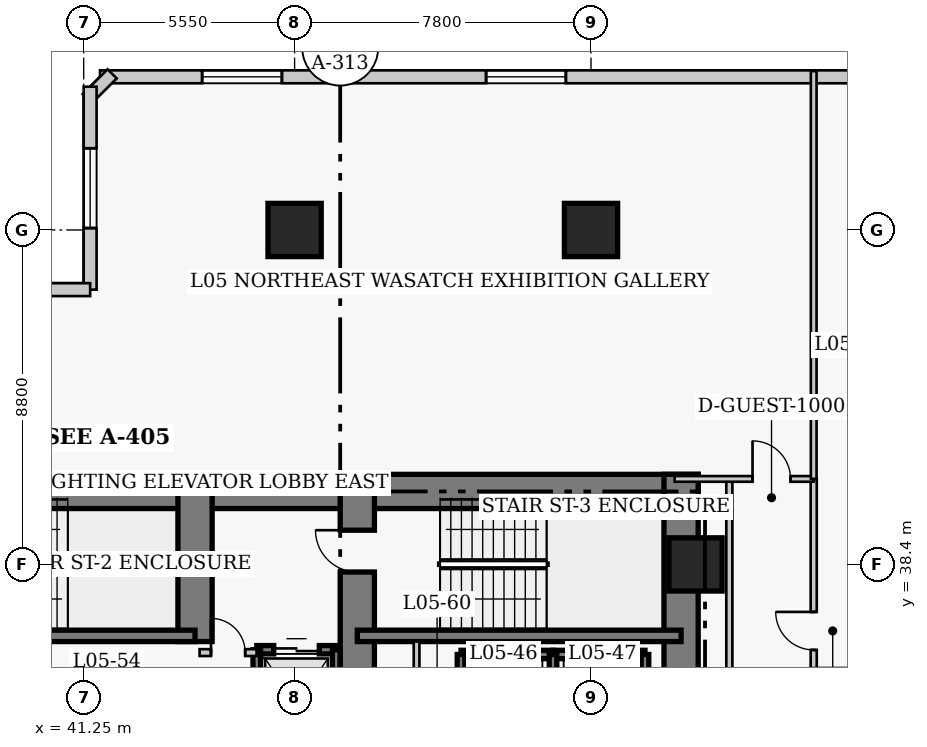
"""IFC4 building model, lengths in metres.
Left out: names, types, materials, properties, quantities, classifications, styles, units other than length and angle.
Written with IfcOpenShell. Run it as: python <this file> out.ifc"""

import sys

from ifc_helpers import new_model, si_unit, direction, frame, frame_2d, origin, origin_2d, place, context, subcontext, project, spatial, rectangle, extrude, element, fill, save


model = new_model("IFC4")
c1 = context("Model", 3, precision=1e-05, world=origin(), true_north=direction((0.0, 1.0)))
c2 = subcontext(c1, "Body", "Model", "MODEL_VIEW")
j1 = project(units=[si_unit("LENGTHUNIT", "METRE"), si_unit("PLANEANGLEUNIT", "RADIAN")], contexts=[c1])
p1 = place(None, origin())
s1 = spatial("IfcSite", under=j1, at=p1, CompositionType="ELEMENT")
p2 = place(p1, origin())
s2 = spatial("IfcBuilding", under=s1, at=p2, CompositionType="ELEMENT")
p3 = place(p2, frame((0.0, 0.0, 26.0)))
s3 = spatial("IfcBuildingStorey", under=s2, at=p3, CompositionType="ELEMENT", Elevation=26.0)
p4 = place(p3, frame((35.85, 40.32, 0.0), z_axis=(0.0, 0.0, 1.0), x_axis=(1.0, 0.0, 0.0)))
e1 = element("IfcWall", 1, at=p4, inside=s3, PredefinedType="SHEAR", context=c2, shape_type="SweptSolid", body=[
    extrude(rectangle(XDim=12.6, YDim=0.9, at=frame_2d((6.3, 0.0))), origin(), (0.0, 0.0, 1.0), 3.8),
])
p5 = place(p3, frame((48.45, 40.32, 0.0), z_axis=(0.0, 0.0, 1.0), x_axis=(1.0, 0.0, 0.0)))
e2 = element("IfcWall", 2, at=p5, inside=s3, PredefinedType="SHEAR", context=c2, shape_type="SweptSolid", body=[
    extrude(rectangle(XDim=8.97, YDim=0.9, at=frame_2d((4.485, 0.0))), origin(), (0.0, 0.0, 1.0), 3.8),
])
p6 = place(p3, frame((56.97, 27.05, 0.0), z_axis=(0.0, 0.0, 1.0), x_axis=(0.0, 1.0, 0.0)))
e3 = element("IfcWall", 3, at=p6, inside=s3, PredefinedType="SHEAR", context=c2, shape_type="SweptSolid", body=[
    extrude(rectangle(XDim=13.72, YDim=0.9, at=frame_2d((6.86, 0.0))), origin(), (0.0, 0.0, 1.0), 3.8),
])
p7 = place(p3, frame((44.18, 36.37, 0.0), z_axis=(0.0, 0.0, 1.0), x_axis=(0.0, 1.0, 0.0)))
e4 = element("IfcWall", 4, at=p7, inside=s3, PredefinedType="SHEAR", context=c2, shape_type="SweptSolid", body=[
    extrude(rectangle(XDim=3.95, YDim=0.9, at=frame_2d((1.975, 0.0))), origin(), (0.0, 0.0, 1.0), 3.8),
])
p8 = place(p3, frame((48.45, 32.3, 0.0), z_axis=(0.0, 0.0, 1.0), x_axis=(0.0, 1.0, 0.0)))
e5 = element("IfcWall", 5, at=p8, inside=s3, PredefinedType="SHEAR", context=c2, shape_type="SweptSolid", body=[
    extrude(rectangle(XDim=8.02, YDim=0.9, at=frame_2d((4.01, 0.0))), origin(), (0.0, 0.0, 1.0), 3.8),
])
p9 = place(p8, frame((5.9, 0.0, 0.0)))
e6 = element("IfcOpeningElement", 6, at=p9, cuts=e5, PredefinedType="OPENING", context=c2, shape_type="SweptSolid", body=[
    extrude(rectangle(XDim=1.1, YDim=2.15, at=frame_2d((0.55, 1.075))), frame((0.0, 0.46, 0.0), z_axis=(0.0, -1.0, 0.0), x_axis=(1.0, 0.0, 0.0)), (0.0, 0.0, 1.0), 0.92),
])
p10 = place(p3, frame((35.85, 36.52, 0.0), z_axis=(0.0, 0.0, 1.0), x_axis=(1.0, 0.0, 0.0)))
e7 = element("IfcWall", 7, at=p10, inside=s3, PredefinedType="SHEAR", context=c2, shape_type="SweptSolid", body=[
    extrude(rectangle(XDim=8.33, YDim=0.3, at=frame_2d((4.165, 0.0))), origin(), (0.0, 0.0, 1.0), 3.8),
])
p11 = place(p3, frame((48.45, 36.52, 0.0), z_axis=(0.0, 0.0, 1.0), x_axis=(1.0, 0.0, 0.0)))
e8 = element("IfcWall", 8, at=p11, inside=s3, PredefinedType="SHEAR", context=c2, shape_type="SweptSolid", body=[
    extrude(rectangle(XDim=8.52, YDim=0.3, at=frame_2d((4.26, 0.0))), origin(), (0.0, 0.0, 1.0), 3.8),
])
for number, where, z_axis, x_axis in (
    (9, (46.8, 47.2, 0.0), (0.0, 0.0, 1.0), (1.0, 0.0, 0.0)),
    (10, (54.6, 47.2, 0.0), (0.0, 0.0, 1.0), (1.0, 0.0, 0.0)),
    (11, (57.35, 38.4, 0.0), (0.0, 0.0, 1.0), (1.0, 0.0, 0.0)),
):
    element("IfcColumn", number, at=place(p3, frame(where, z_axis=z_axis, x_axis=x_axis)), inside=s3, PredefinedType="COLUMN", context=c2, shape_type="SweptSolid", body=[
        extrude(rectangle(XDim=1.4, YDim=1.4, at=origin_2d()), origin(), (0.0, 0.0, 1.0), 3.8),
    ])
p12 = place(p3, frame((71.57, 51.23, 0.0), z_axis=(0.0, 0.0, 1.0), x_axis=(-1.0, 0.0, 0.0)))
e12 = element("IfcWall", 12, at=p12, inside=s3, PredefinedType="SOLIDWALL", context=c2, shape_type="SweptSolid", body=[
    extrude(rectangle(XDim=29.89, YDim=0.34, at=frame_2d((14.945, 0.0))), origin(), (0.0, 0.0, 1.0), 3.54),
])
p13 = place(p12, frame((2.686, 0.0, 0.85)))
e13 = element("IfcOpeningElement", 13, at=p13, cuts=e12, PredefinedType="OPENING", context=c2, shape_type="SweptSolid", body=[
    extrude(rectangle(XDim=2.1, YDim=1.85, at=frame_2d((1.05, 0.925))), frame((0.0, 0.18, 0.0), z_axis=(0.0, -1.0, 0.0), x_axis=(1.0, 0.0, 0.0)), (0.0, 0.0, 1.0), 0.36),
])
p14 = place(p12, frame((17.631, 0.0, 0.85)))
e14 = element("IfcOpeningElement", 14, at=p14, cuts=e12, PredefinedType="OPENING", context=c2, shape_type="SweptSolid", body=[
    extrude(rectangle(XDim=2.1, YDim=1.85, at=frame_2d((1.05, 0.925))), frame((0.0, 0.18, 0.0), z_axis=(0.0, -1.0, 0.0), x_axis=(1.0, 0.0, 0.0)), (0.0, 0.0, 1.0), 0.36),
])
p15 = place(p12, frame((25.104, 0.0, 0.85)))
e15 = element("IfcOpeningElement", 15, at=p15, cuts=e12, PredefinedType="OPENING", context=c2, shape_type="SweptSolid", body=[
    extrude(rectangle(XDim=2.1, YDim=1.85, at=frame_2d((1.05, 0.925))), frame((0.0, 0.18, 0.0), z_axis=(0.0, -1.0, 0.0), x_axis=(1.0, 0.0, 0.0)), (0.0, 0.0, 1.0), 0.36),
])
p16 = place(p3, frame((41.999, 51.308, 0.0), z_axis=(0.0, 0.0, 1.0), x_axis=(-0.707238225886, -0.706975312048, 0.0)))
e16 = element("IfcWall", 16, at=p16, inside=s3, PredefinedType="SOLIDWALL", context=c2, shape_type="SweptSolid", body=[
    extrude(rectangle(XDim=0.929, YDim=0.34, at=frame_2d((0.464, 0.0))), origin(), (0.0, 0.0, 1.0), 3.54),
])
p17 = place(p3, frame((41.42, 50.97, 0.0), z_axis=(0.0, 0.0, 1.0), x_axis=(0.0, -1.0, 0.0)))
e17 = element("IfcWall", 17, at=p17, inside=s3, PredefinedType="SOLIDWALL", context=c2, shape_type="SweptSolid", body=[
    extrude(rectangle(XDim=5.34, YDim=0.34, at=frame_2d((2.67, 0.0))), origin(), (0.0, 0.0, 1.0), 3.54),
])
p18 = place(p17, frame((1.62, 0.0, 0.85)))
e18 = element("IfcOpeningElement", 18, at=p18, cuts=e17, PredefinedType="OPENING", context=c2, shape_type="SweptSolid", body=[
    extrude(rectangle(XDim=2.1, YDim=1.85, at=frame_2d((1.05, 0.925))), frame((0.0, 0.18, 0.0), z_axis=(0.0, -1.0, 0.0), x_axis=(1.0, 0.0, 0.0)), (0.0, 0.0, 1.0), 0.36),
])
p19 = place(p3, frame((41.42, 45.63, 0.0), z_axis=(0.0, 0.0, 1.0), x_axis=(-1.0, 0.0, 0.0)))
e19 = element("IfcWall", 19, at=p19, inside=s3, PredefinedType="SOLIDWALL", context=c2, shape_type="SweptSolid", body=[
    extrude(rectangle(XDim=4.84, YDim=0.34, at=frame_2d((2.42, 0.0))), origin(), (0.0, 0.0, 1.0), 3.54),
])
p20 = place(p19, frame((1.37, 0.0, 0.85)))
e20 = element("IfcOpeningElement", 20, at=p20, cuts=e19, PredefinedType="OPENING", context=c2, shape_type="SweptSolid", body=[
    extrude(rectangle(XDim=2.1, YDim=1.85, at=frame_2d((1.05, 0.925))), frame((0.0, 0.18, 0.0), z_axis=(0.0, -1.0, 0.0), x_axis=(1.0, 0.0, 0.0)), (0.0, 0.0, 1.0), 0.36),
])
p21 = place(p3, frame((51.18, 36.03, 0.0), z_axis=(0.0, 0.0, 1.0), x_axis=(1.0, 0.0, 0.0)))
e21 = element("IfcWall", 21, at=p21, inside=s3, PredefinedType="SHEAR", context=c2, shape_type="SweptSolid", body=[
    extrude(rectangle(XDim=2.42, YDim=0.22, at=frame_2d((1.21, 0.0))), origin(), (0.0, 0.0, 1.0), 3.8),
])
p22 = place(p3, frame((51.18, 33.17, 0.0), z_axis=(0.0, 0.0, 1.0), x_axis=(0.0, 1.0, 0.0)))
e22 = element("IfcWall", 22, at=p22, inside=s3, PredefinedType="SHEAR", context=c2, shape_type="SweptSolid", body=[
    extrude(rectangle(XDim=2.86, YDim=0.2, at=frame_2d((1.43, 0.0))), origin(), (0.0, 0.0, 1.0), 3.8),
])
p23 = place(p3, frame((53.6, 36.03, 0.0), z_axis=(0.0, 0.0, 1.0), x_axis=(1.0, 0.0, 0.0)))
e23 = element("IfcWall", 23, at=p23, inside=s3, PredefinedType="SHEAR", context=c2, shape_type="SweptSolid", body=[
    extrude(rectangle(XDim=2.42, YDim=0.22, at=frame_2d((1.21, 0.0))), origin(), (0.0, 0.0, 1.0), 3.8),
])
for number, where, z_axis, x_axis in (
    (24, (53.6, 33.17, 0.0), (0.0, 0.0, 1.0), (0.0, 1.0, 0.0)),
    (25, (56.02, 33.17, 0.0), (0.0, 0.0, 1.0), (0.0, 1.0, 0.0)),
):
    element("IfcWall", number, at=place(p3, frame(where, z_axis=z_axis, x_axis=x_axis)), inside=s3, PredefinedType="SHEAR", context=c2, shape_type="SweptSolid", body=[
        extrude(rectangle(XDim=2.86, YDim=0.2, at=frame_2d((1.43, 0.0))), origin(), (0.0, 0.0, 1.0), 3.8),
    ])
p24 = place(p3, frame((45.805, 36.155, 0.0), z_axis=(0.0, 0.0, 1.0), x_axis=(1.0, 0.0, 0.0)))
e26 = element("IfcWall", 26, at=p24, inside=s3, PredefinedType="SHEAR", context=c2, shape_type="SweptSolid", body=[
    extrude(rectangle(XDim=2.09, YDim=0.22, at=frame_2d((1.045, 0.0))), origin(), (0.0, 0.0, 1.0), 3.8),
])
p25 = place(p24, frame((0.445, 0.0, 0.0)))
e27 = element("IfcOpeningElement", 27, at=p25, cuts=e26, PredefinedType="OPENING", context=c2, shape_type="SweptSolid", body=[
    extrude(rectangle(XDim=1.2, YDim=2.15, at=frame_2d((0.6, 1.075))), frame((0.0, 0.12, 0.0), z_axis=(0.0, -1.0, 0.0), x_axis=(1.0, 0.0, 0.0)), (0.0, 0.0, 1.0), 0.24),
])
p26 = place(p3, frame((45.805, 32.65, 0.0), z_axis=(0.0, 0.0, 1.0), x_axis=(0.0, 1.0, 0.0)))
e28 = element("IfcWall", 28, at=p26, inside=s3, PredefinedType="SHEAR", context=c2, shape_type="SweptSolid", body=[
    extrude(rectangle(XDim=3.505, YDim=0.2, at=frame_2d((1.752, 0.0))), origin(), (0.0, 0.0, 1.0), 3.8),
])
p27 = place(p3, frame((47.895, 33.245, 0.0), z_axis=(0.0, 0.0, 1.0), x_axis=(0.0, 1.0, 0.0)))
e29 = element("IfcWall", 29, at=p27, inside=s3, PredefinedType="SHEAR", context=c2, shape_type="SweptSolid", body=[
    extrude(rectangle(XDim=2.91, YDim=0.2, at=frame_2d((1.455, 0.0))), origin(), (0.0, 0.0, 1.0), 3.8),
])
p28 = place(p3, frame((44.3, 36.08, 0.0), z_axis=(0.0, 0.0, 1.0), x_axis=(1.0, 0.0, 0.0)))
e30 = element("IfcWall", 30, at=p28, inside=s3, PredefinedType="PARTITIONING", context=c2, shape_type="SweptSolid", body=[
    extrude(rectangle(XDim=1.5, YDim=0.18, at=frame_2d((0.75, 0.0))), origin(), (0.0, 0.0, 1.0), 3.54),
])
p29 = place(p28, frame((0.3, 0.0, 0.0)))
e31 = element("IfcOpeningElement", 31, at=p29, cuts=e30, PredefinedType="OPENING", context=c2, shape_type="SweptSolid", body=[
    extrude(rectangle(XDim=0.9, YDim=2.15, at=frame_2d((0.45, 1.075))), frame((0.0, 0.1, 0.0), z_axis=(0.0, -1.0, 0.0), x_axis=(1.0, 0.0, 0.0)), (0.0, 0.0, 1.0), 0.2),
])
p30 = place(p3, frame((50.01, 32.75, 0.0), z_axis=(0.0, 0.0, 1.0), x_axis=(0.0, 1.0, 0.0)))
e32 = element("IfcWall", 32, at=p30, inside=s3, PredefinedType="PARTITIONING", context=c2, shape_type="SweptSolid", body=[
    extrude(rectangle(XDim=3.62, YDim=0.15, at=frame_2d((1.81, 0.0))), origin(), (0.0, 0.0, 1.0), 3.54),
])
p31 = place(p3, frame((60.46, 10.25, 0.0), z_axis=(0.0, 0.0, 1.0), x_axis=(0.0, 1.0, 0.0)))
e33 = element("IfcWall", 33, at=p31, inside=s3, PredefinedType="PARTITIONING", context=c2, shape_type="SweptSolid", body=[
    extrude(rectangle(XDim=30.4, YDim=0.16, at=frame_2d((15.2, 0.0))), origin(), (0.0, 0.0, 1.0), 3.54),
])
p32 = place(p31, frame((4.4, 0.0, 0.0)))
e34 = element("IfcOpeningElement", 34, at=p32, cuts=e33, PredefinedType="OPENING", context=c2, shape_type="SweptSolid", body=[
    extrude(rectangle(XDim=0.95, YDim=2.1, at=frame_2d((0.475, 1.05))), frame((0.0, 0.09, 0.0), z_axis=(0.0, -1.0, 0.0), x_axis=(1.0, 0.0, 0.0)), (0.0, 0.0, 1.0), 0.18),
])
p33 = place(p31, frame((13.675, 0.0, 0.0)))
e35 = element("IfcOpeningElement", 35, at=p33, cuts=e33, PredefinedType="OPENING", context=c2, shape_type="SweptSolid", body=[
    extrude(rectangle(XDim=0.95, YDim=2.1, at=frame_2d((0.475, 1.05))), frame((0.0, 0.09, 0.0), z_axis=(0.0, -1.0, 0.0), x_axis=(1.0, 0.0, 0.0)), (0.0, 0.0, 1.0), 0.18),
])
p34 = place(p31, frame((21.475, 0.0, 0.0)))
e36 = element("IfcOpeningElement", 36, at=p34, cuts=e33, PredefinedType="OPENING", context=c2, shape_type="SweptSolid", body=[
    extrude(rectangle(XDim=0.95, YDim=2.1, at=frame_2d((0.475, 1.05))), frame((0.0, 0.09, 0.0), z_axis=(0.0, -1.0, 0.0), x_axis=(1.0, 0.0, 0.0)), (0.0, 0.0, 1.0), 0.18),
])
p35 = place(p31, frame((25.9, 0.0, 0.0)))
e37 = element("IfcOpeningElement", 37, at=p35, cuts=e33, PredefinedType="OPENING", context=c2, shape_type="SweptSolid", body=[
    extrude(rectangle(XDim=1.0, YDim=2.15, at=frame_2d((0.5, 1.075))), frame((0.0, 0.09, 0.0), z_axis=(0.0, -1.0, 0.0), x_axis=(1.0, 0.0, 0.0)), (0.0, 0.0, 1.0), 0.18),
])
p36 = place(p3, frame((58.24, 24.71, 0.0), z_axis=(0.0, 0.0, 1.0), x_axis=(0.0, 1.0, 0.0)))
e38 = element("IfcWall", 38, at=p36, inside=s3, PredefinedType="PARTITIONING", context=c2, shape_type="SweptSolid", body=[
    extrude(rectangle(XDim=15.94, YDim=0.16, at=frame_2d((7.97, 0.0))), origin(), (0.0, 0.0, 1.0), 3.54),
])
p37 = place(p3, frame((56.8, 40.65, 0.0), z_axis=(0.0, 0.0, 1.0), x_axis=(1.0, 0.0, 0.0)))
e39 = element("IfcWall", 39, at=p37, inside=s3, PredefinedType="PARTITIONING", context=c2, shape_type="SweptSolid", body=[
    extrude(rectangle(XDim=3.66, YDim=0.15, at=frame_2d((1.83, 0.0))), origin(), (0.0, 0.0, 1.0), 3.54),
])
p38 = place(p37, frame((2.05, 0.0, 0.0)))
e40 = element("IfcOpeningElement", 40, at=p38, cuts=e39, PredefinedType="OPENING", context=c2, shape_type="SweptSolid", body=[
    extrude(rectangle(XDim=1.0, YDim=2.15, at=frame_2d((0.5, 1.075))), frame((0.0, 0.085, 0.0), z_axis=(0.0, -1.0, 0.0), x_axis=(1.0, 0.0, 0.0)), (0.0, 0.0, 1.0), 0.17),
])
p39 = place(p3, frame((60.46, 40.65, 0.0), z_axis=(0.0, 0.0, 1.0), x_axis=(0.0, 1.0, 0.0)))
e41 = element("IfcWall", 41, at=p39, inside=s3, PredefinedType="PARTITIONING", context=c2, shape_type="SweptSolid", body=[
    extrude(rectangle(XDim=10.73, YDim=0.15, at=frame_2d((5.365, 0.0))), origin(), (0.0, 0.0, 1.0), 3.54),
])
p40 = place(p14, origin())
e42 = element("IfcWindow", 42, at=p40, inside=s3, PartitioningType="SINGLE_PANEL", PredefinedType="WINDOW", context=c2, shape_type="SweptSolid", body=[
    extrude(rectangle(XDim=2.1, YDim=1.85, at=frame_2d((1.05, 0.925))), frame((0.0, 0.03, 0.0), z_axis=(0.0, -1.0, 0.0), x_axis=(1.0, 0.0, 0.0)), (0.0, 0.0, 1.0), 0.06),
])
fill(e14, e42)
p41 = place(p15, origin())
e43 = element("IfcWindow", 43, at=p41, inside=s3, PartitioningType="SINGLE_PANEL", PredefinedType="WINDOW", context=c2, shape_type="SweptSolid", body=[
    extrude(rectangle(XDim=2.1, YDim=1.85, at=frame_2d((1.05, 0.925))), frame((0.0, 0.03, 0.0), z_axis=(0.0, -1.0, 0.0), x_axis=(1.0, 0.0, 0.0)), (0.0, 0.0, 1.0), 0.06),
])
fill(e15, e43)
p42 = place(p18, origin())
e44 = element("IfcWindow", 44, at=p42, inside=s3, PartitioningType="SINGLE_PANEL", PredefinedType="WINDOW", context=c2, shape_type="SweptSolid", body=[
    extrude(rectangle(XDim=2.1, YDim=1.85, at=frame_2d((1.05, 0.925))), frame((0.0, 0.03, 0.0), z_axis=(0.0, -1.0, 0.0), x_axis=(1.0, 0.0, 0.0)), (0.0, 0.0, 1.0), 0.06),
])
fill(e18, e44)
p43 = place(p25, origin())
e45 = element("IfcDoor", 45, at=p43, inside=s3, OperationType="DOUBLE_DOOR_SLIDING", PredefinedType="DOOR", context=c2, shape_type="SweptSolid", body=[
    extrude(rectangle(XDim=1.2, YDim=2.15, at=frame_2d((0.6, 1.075))), frame((0.0, 0.025, 0.0), z_axis=(0.0, -1.0, 0.0), x_axis=(1.0, 0.0, 0.0)), (0.0, 0.0, 1.0), 0.05),
])
fill(e27, e45)
p44 = place(p29, origin())
e46 = element("IfcDoor", 46, at=p44, inside=s3, OperationType="SINGLE_SWING_LEFT", PredefinedType="DOOR", context=c2, shape_type="SweptSolid", body=[
    extrude(rectangle(XDim=0.9, YDim=2.15, at=frame_2d((0.45, 1.075))), frame((0.0, 0.025, 0.0), z_axis=(0.0, -1.0, 0.0), x_axis=(1.0, 0.0, 0.0)), (0.0, 0.0, 1.0), 0.05),
])
fill(e31, e46)
p45 = place(p38, origin())
e47 = element("IfcDoor", 47, at=p45, inside=s3, OperationType="SINGLE_SWING_LEFT", PredefinedType="DOOR", context=c2, shape_type="SweptSolid", body=[
    extrude(rectangle(XDim=1.0, YDim=2.15, at=frame_2d((0.5, 1.075))), frame((0.0, 0.025, 0.0), z_axis=(0.0, -1.0, 0.0), x_axis=(1.0, 0.0, 0.0)), (0.0, 0.0, 1.0), 0.05),
])
fill(e40, e47)
p46 = place(p35, origin())
e48 = element("IfcDoor", 48, at=p46, inside=s3, OperationType="SINGLE_SWING_RIGHT", PredefinedType="DOOR", context=c2, shape_type="SweptSolid", body=[
    extrude(rectangle(XDim=1.0, YDim=2.15, at=frame_2d((0.5, 1.075))), frame((0.0, 0.025, 0.0), z_axis=(0.0, -1.0, 0.0), x_axis=(1.0, 0.0, 0.0)), (0.0, 0.0, 1.0), 0.05),
])
fill(e37, e48)
p47 = place(p9, origin())
e49 = element("IfcDoor", 49, at=p47, inside=s3, OperationType="SINGLE_SWING_RIGHT", PredefinedType="DOOR", context=c2, shape_type="SweptSolid", body=[
    extrude(rectangle(XDim=1.1, YDim=2.15, at=frame_2d((0.55, 1.075))), frame((0.0, 0.025, 0.0), z_axis=(0.0, -1.0, 0.0), x_axis=(1.0, 0.0, 0.0)), (0.0, 0.0, 1.0), 0.05),
])
fill(e6, e49)
save(model, sys.argv[1])
